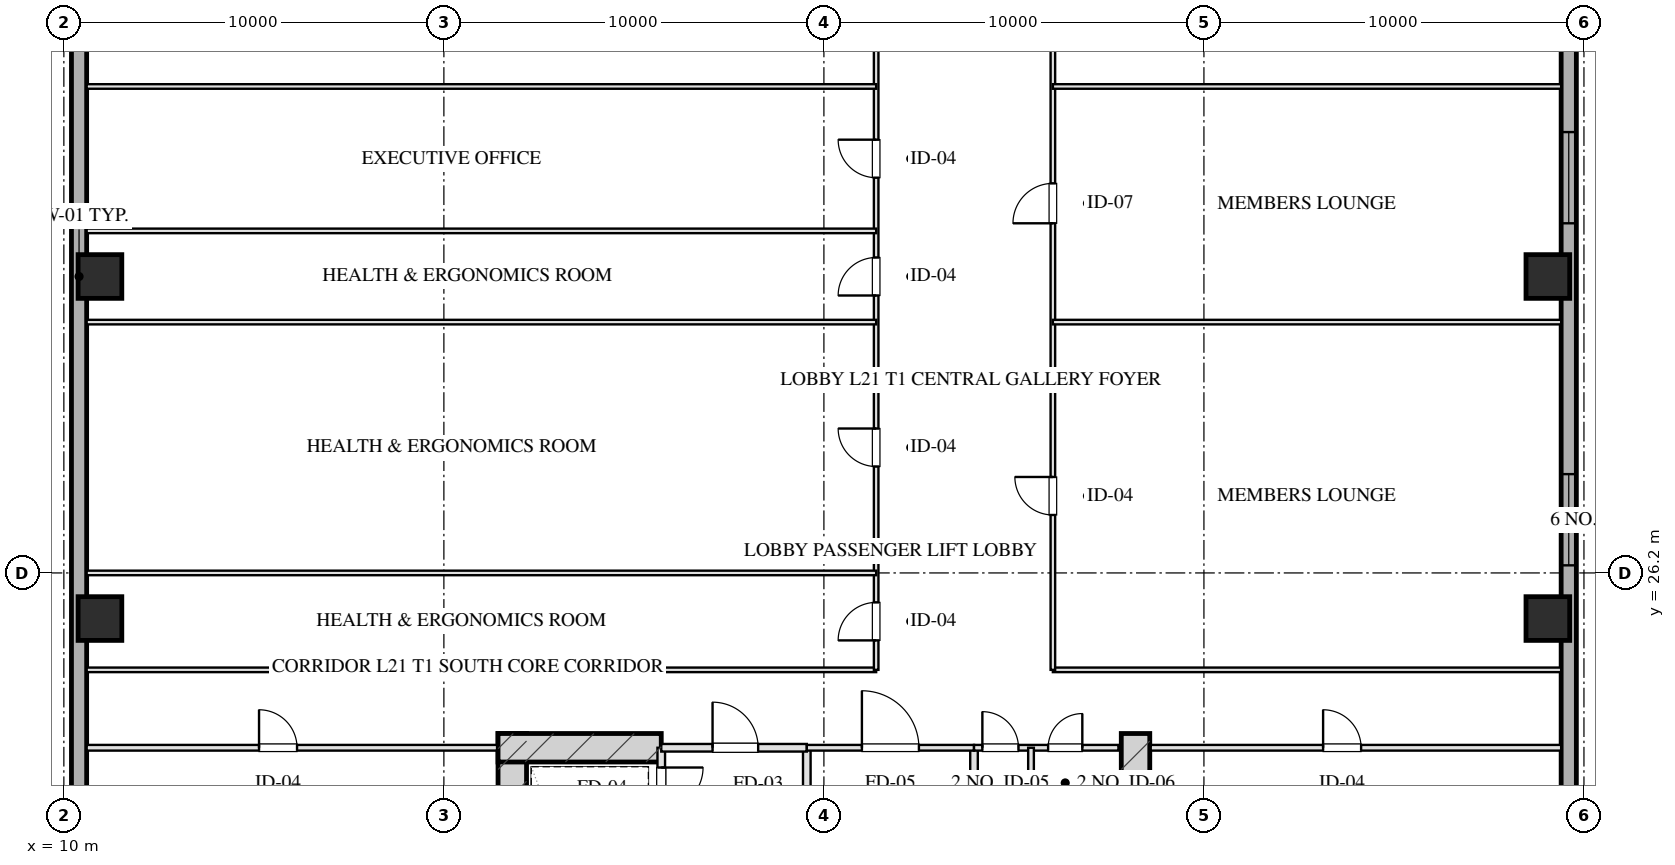
"""IFC4 building model, lengths in metres.
Left out: names, types, materials, properties, quantities, classifications, styles, units other than length and angle.
Written with IfcOpenShell. Run it as: python <this file> out.ifc"""

import sys

from ifc_helpers import new_model, si_unit, direction, frame, frame_2d, origin, origin_2d, place, context, subcontext, project, spatial, rectangle, hollow_rectangle, extrude, element, fill, save


model = new_model("IFC4")
c1 = context("Model", 3, precision=1e-05, world=origin(), true_north=direction((0.0, 1.0)))
c2 = subcontext(c1, "Body", "Model", "MODEL_VIEW")
j1 = project(units=[si_unit("LENGTHUNIT", "METRE"), si_unit("PLANEANGLEUNIT", "RADIAN")], contexts=[c1])
p1 = place(None, origin())
s1 = spatial("IfcSite", under=j1, at=p1, CompositionType="ELEMENT")
p2 = place(p1, origin())
s2 = spatial("IfcBuilding", under=s1, at=p2, CompositionType="ELEMENT")
p3 = place(p2, frame((0.0, 0.0, 85.1)))
s3 = spatial("IfcBuildingStorey", under=s2, at=p3, CompositionType="ELEMENT", Elevation=85.1)
for number, where, z_axis, x_axis in (
    (1, (21.8, 21.975, 0.0), (0.0, 0.0, 1.0), (0.0, -1.0, 0.0)),
    (2, (38.2, 21.975, 0.0), (0.0, 0.0, 1.0), (0.0, -1.0, 0.0)),
):
    element("IfcWall", number, at=place(p3, frame(where, z_axis=z_axis, x_axis=x_axis)), inside=s3, PredefinedType="SHEAR", context=c2, shape_type="SweptSolid", body=[
        extrude(rectangle(XDim=9.63, YDim=0.75, at=frame_2d((4.815, 0.0))), origin(), (0.0, 0.0, 1.0), 3.45),
    ])
p4 = place(p3, frame((21.425, 21.6, 0.0), z_axis=(0.0, 0.0, 1.0), x_axis=(1.0, 0.0, 0.0)))
e3 = element("IfcWall", 3, at=p4, inside=s3, PredefinedType="SHEAR", context=c2, shape_type="SweptSolid", body=[
    extrude(rectangle(XDim=4.295, YDim=0.75, at=frame_2d((2.147, 0.0))), origin(), (0.0, 0.0, 1.0), 3.45),
])
for number, where, z_axis, x_axis in (
    (4, (10.95, 25.0, 0.0), (0.0, 0.0, 1.0), (1.0, 0.0, 0.0)),
    (5, (10.95, 34.0, 0.0), (0.0, 0.0, 1.0), (1.0, 0.0, 0.0)),
    (6, (49.05, 25.0, 0.0), (0.0, 0.0, 1.0), (1.0, 0.0, 0.0)),
    (7, (49.05, 34.0, 0.0), (0.0, 0.0, 1.0), (1.0, 0.0, 0.0)),
):
    element("IfcColumn", number, at=place(p3, frame(where, z_axis=z_axis, x_axis=x_axis)), inside=s3, PredefinedType="COLUMN", context=c2, shape_type="SweptSolid", body=[
        extrude(hollow_rectangle(XDim=1.15, YDim=1.15, WallThickness=0.04, at=origin_2d()), origin(), (0.0, 0.0, 1.0), 3.451),
    ])
p5 = place(p3, frame((10.4, 7.2, 0.0), z_axis=(0.0, 0.0, 1.0), x_axis=(0.0, 1.0, 0.0)))
e8 = element("IfcWall", 8, at=p5, inside=s3, PredefinedType="SOLIDWALL", context=c2, shape_type="SweptSolid", body=[
    extrude(rectangle(XDim=53.6, YDim=0.4, at=frame_2d((26.8, 0.0))), origin(), (0.0, 0.0, 1.0), 2.61),
])
p6 = place(p3, frame((49.6, 60.8, 0.0), z_axis=(0.0, 0.0, 1.0), x_axis=(0.0, -1.0, 0.0)))
e9 = element("IfcWall", 9, at=p6, inside=s3, PredefinedType="SOLIDWALL", context=c2, shape_type="SweptSolid", body=[
    extrude(rectangle(XDim=53.6, YDim=0.4, at=frame_2d((26.8, 0.0))), origin(), (0.0, 0.0, 1.0), 2.61),
])
p7 = place(p6, frame((32.0, 0.0, 0.75)))
e10 = element("IfcOpeningElement", 10, at=p7, cuts=e9, PredefinedType="OPENING", context=c2, shape_type="SweptSolid", body=[
    extrude(rectangle(XDim=2.4, YDim=1.46, at=frame_2d((1.2, 0.73))), frame((0.0, 0.21, 0.0), z_axis=(0.0, -1.0, 0.0), x_axis=(1.0, 0.0, 0.0)), (0.0, 0.0, 1.0), 0.42),
])
p8 = place(p6, frame((23.0, 0.0, 0.75)))
e11 = element("IfcOpeningElement", 11, at=p8, cuts=e9, PredefinedType="OPENING", context=c2, shape_type="SweptSolid", body=[
    extrude(rectangle(XDim=2.4, YDim=1.46, at=frame_2d((1.2, 0.73))), frame((0.0, 0.21, 0.0), z_axis=(0.0, -1.0, 0.0), x_axis=(1.0, 0.0, 0.0)), (0.0, 0.0, 1.0), 0.42),
])
p9 = place(p3, frame((25.72, 21.6, 0.0), z_axis=(0.0, 0.0, 1.0), x_axis=(0.0, -1.0, 0.0)))
e12 = element("IfcWall", 12, at=p9, inside=s3, PredefinedType="PARTITIONING", context=c2, shape_type="SweptSolid", body=[
    extrude(rectangle(XDim=1.9, YDim=0.2, at=frame_2d((0.95, 0.0))), origin(), (0.0, 0.0, 1.0), 3.175),
])
p10 = place(p9, frame((0.52, 0.0, 0.0)))
e13 = element("IfcOpeningElement", 13, at=p10, cuts=e12, PredefinedType="OPENING", context=c2, shape_type="SweptSolid", body=[
    extrude(rectangle(XDim=1.1, YDim=2.05, at=frame_2d((0.55, 1.025))), frame((0.0, 0.11, 0.0), z_axis=(0.0, -1.0, 0.0), x_axis=(1.0, 0.0, 0.0)), (0.0, 0.0, 1.0), 0.22),
])
p11 = place(p3, frame((29.55, 21.6, 0.0), z_axis=(0.0, 0.0, 1.0), x_axis=(0.0, -1.0, 0.0)))
e14 = element("IfcWall", 14, at=p11, inside=s3, PredefinedType="PARTITIONING", context=c2, shape_type="SweptSolid", body=[
    extrude(rectangle(XDim=8.43, YDim=0.2, at=frame_2d((4.215, 0.0))), origin(), (0.0, 0.0, 1.0), 3.175),
])
p12 = place(p3, frame((25.72, 21.6, 0.0), z_axis=(0.0, 0.0, 1.0), x_axis=(1.0, 0.0, 0.0)))
e15 = element("IfcWall", 15, at=p12, inside=s3, PredefinedType="PARTITIONING", context=c2, shape_type="SweptSolid", body=[
    extrude(rectangle(XDim=3.83, YDim=0.2, at=frame_2d((1.915, 0.0))), origin(), (0.0, 0.0, 1.0), 3.175),
])
p13 = place(p12, frame((1.35, 0.0, 0.0)))
e16 = element("IfcOpeningElement", 16, at=p13, cuts=e15, PredefinedType="OPENING", context=c2, shape_type="SweptSolid", body=[
    extrude(rectangle(XDim=1.2, YDim=2.05, at=frame_2d((0.6, 1.025))), frame((0.0, 0.11, 0.0), z_axis=(0.0, -1.0, 0.0), x_axis=(1.0, 0.0, 0.0)), (0.0, 0.0, 1.0), 0.22),
])
p14 = place(p3, frame((33.95, 21.6, 0.0), z_axis=(0.0, 0.0, 1.0), x_axis=(0.0, -1.0, 0.0)))
e17 = element("IfcWall", 17, at=p14, inside=s3, PredefinedType="PARTITIONING", context=c2, shape_type="SweptSolid", body=[
    extrude(rectangle(XDim=8.43, YDim=0.2, at=frame_2d((4.215, 0.0))), origin(), (0.0, 0.0, 1.0), 3.175),
])
p15 = place(p3, frame((29.55, 21.6, 0.0), z_axis=(0.0, 0.0, 1.0), x_axis=(1.0, 0.0, 0.0)))
e18 = element("IfcWall", 18, at=p15, inside=s3, PredefinedType="PARTITIONING", context=c2, shape_type="SweptSolid", body=[
    extrude(rectangle(XDim=4.4, YDim=0.15, at=frame_2d((2.2, 0.0))), origin(), (0.0, 0.0, 1.0), 3.175),
])
p16 = place(p15, frame((1.45, 0.0, 0.0)))
e19 = element("IfcOpeningElement", 19, at=p16, cuts=e18, PredefinedType="OPENING", context=c2, shape_type="SweptSolid", body=[
    extrude(rectangle(XDim=1.5, YDim=2.05, at=frame_2d((0.75, 1.025))), frame((0.0, 0.085, 0.0), z_axis=(0.0, -1.0, 0.0), x_axis=(1.0, 0.0, 0.0)), (0.0, 0.0, 1.0), 0.17),
])
p17 = place(p3, frame((33.95, 21.6, 0.0), z_axis=(0.0, 0.0, 1.0), x_axis=(1.0, 0.0, 0.0)))
e20 = element("IfcWall", 20, at=p17, inside=s3, PredefinedType="PARTITIONING", context=c2, shape_type="SweptSolid", body=[
    extrude(rectangle(XDim=3.8, YDim=0.15, at=frame_2d((1.9, 0.0))), origin(), (0.0, 0.0, 1.0), 3.175),
])
p18 = place(p17, frame((0.22, 0.0, 0.0)))
e21 = element("IfcOpeningElement", 21, at=p18, cuts=e20, PredefinedType="OPENING", context=c2, shape_type="SweptSolid", body=[
    extrude(rectangle(XDim=0.95, YDim=2.05, at=frame_2d((0.475, 1.025))), frame((0.0, 0.085, 0.0), z_axis=(0.0, -1.0, 0.0), x_axis=(1.0, 0.0, 0.0)), (0.0, 0.0, 1.0), 0.17),
])
p19 = place(p17, frame((1.95, 0.0, 0.0)))
e22 = element("IfcOpeningElement", 22, at=p19, cuts=e20, PredefinedType="OPENING", context=c2, shape_type="SweptSolid", body=[
    extrude(rectangle(XDim=0.9, YDim=2.05, at=frame_2d((0.45, 1.025))), frame((0.0, 0.085, 0.0), z_axis=(0.0, -1.0, 0.0), x_axis=(1.0, 0.0, 0.0)), (0.0, 0.0, 1.0), 0.17),
])
p20 = place(p3, frame((35.45, 21.6, 0.0), z_axis=(0.0, 0.0, 1.0), x_axis=(0.0, -1.0, 0.0)))
e23 = element("IfcWall", 23, at=p20, inside=s3, PredefinedType="PARTITIONING", context=c2, shape_type="SweptSolid", body=[
    extrude(rectangle(XDim=8.43, YDim=0.15, at=frame_2d((4.215, 0.0))), origin(), (0.0, 0.0, 1.0), 2.815),
])
p21 = place(p20, frame((2.55, 0.0, 0.0)))
e24 = element("IfcOpeningElement", 24, at=p21, cuts=e23, PredefinedType="OPENING", context=c2, shape_type="SweptSolid", body=[
    extrude(rectangle(XDim=0.95, YDim=2.05, at=frame_2d((0.475, 1.025))), frame((0.0, 0.085, 0.0), z_axis=(0.0, -1.0, 0.0), x_axis=(1.0, 0.0, 0.0)), (0.0, 0.0, 1.0), 0.17),
])
p22 = place(p20, frame((5.6, 0.0, 0.0)))
e25 = element("IfcOpeningElement", 25, at=p22, cuts=e23, PredefinedType="OPENING", context=c2, shape_type="SweptSolid", body=[
    extrude(rectangle(XDim=0.9, YDim=2.05, at=frame_2d((0.45, 1.025))), frame((0.0, 0.085, 0.0), z_axis=(0.0, -1.0, 0.0), x_axis=(1.0, 0.0, 0.0)), (0.0, 0.0, 1.0), 0.17),
])
p23 = place(p3, frame((10.6, 21.6, 0.0), z_axis=(0.0, 0.0, 1.0), x_axis=(1.0, 0.0, 0.0)))
e26 = element("IfcWall", 26, at=p23, inside=s3, PredefinedType="PARTITIONING", context=c2, shape_type="SweptSolid", body=[
    extrude(rectangle(XDim=10.8, YDim=0.15, at=frame_2d((5.4, 0.0))), origin(), (0.0, 0.0, 1.0), 3.175),
])
p24 = place(p23, frame((4.536, 0.0, 0.0)))
e27 = element("IfcOpeningElement", 27, at=p24, cuts=e26, PredefinedType="OPENING", context=c2, shape_type="SweptSolid", body=[
    extrude(rectangle(XDim=1.0, YDim=2.05, at=frame_2d((0.5, 1.025))), frame((0.0, 0.085, 0.0), z_axis=(0.0, -1.0, 0.0), x_axis=(1.0, 0.0, 0.0)), (0.0, 0.0, 1.0), 0.17),
])
p25 = place(p3, frame((38.6, 21.6, 0.0), z_axis=(0.0, 0.0, 1.0), x_axis=(1.0, 0.0, 0.0)))
e28 = element("IfcWall", 28, at=p25, inside=s3, PredefinedType="PARTITIONING", context=c2, shape_type="SweptSolid", body=[
    extrude(rectangle(XDim=10.8, YDim=0.15, at=frame_2d((5.4, 0.0))), origin(), (0.0, 0.0, 1.0), 3.175),
])
p26 = place(p25, frame((4.536, 0.0, 0.0)))
e29 = element("IfcOpeningElement", 29, at=p26, cuts=e28, PredefinedType="OPENING", context=c2, shape_type="SweptSolid", body=[
    extrude(rectangle(XDim=1.0, YDim=2.05, at=frame_2d((0.5, 1.025))), frame((0.0, 0.085, 0.0), z_axis=(0.0, -1.0, 0.0), x_axis=(1.0, 0.0, 0.0)), (0.0, 0.0, 1.0), 0.17),
])
p27 = place(p3, frame((10.6, 23.65, 0.0), z_axis=(0.0, 0.0, 1.0), x_axis=(1.0, 0.0, 0.0)))
e30 = element("IfcWall", 30, at=p27, inside=s3, PredefinedType="PARTITIONING", context=c2, shape_type="SweptSolid", body=[
    extrude(rectangle(XDim=20.775, YDim=0.12, at=frame_2d((10.387, 0.0))), origin(), (0.0, 0.0, 1.0), 3.175),
])
p28 = place(p3, frame((36.025, 23.65, 0.0), z_axis=(0.0, 0.0, 1.0), x_axis=(1.0, 0.0, 0.0)))
e31 = element("IfcWall", 31, at=p28, inside=s3, PredefinedType="PARTITIONING", context=c2, shape_type="SweptSolid", body=[
    extrude(rectangle(XDim=13.375, YDim=0.12, at=frame_2d((6.688, 0.0))), origin(), (0.0, 0.0, 1.0), 3.175),
])
p29 = place(p3, frame((31.375, 23.65, 0.0), z_axis=(0.0, 0.0, 1.0), x_axis=(0.0, 1.0, 0.0)))
e32 = element("IfcWall", 32, at=p29, inside=s3, PredefinedType="PARTITIONING", context=c2, shape_type="SweptSolid", body=[
    extrude(rectangle(XDim=20.7, YDim=0.12, at=frame_2d((10.35, 0.0))), origin(), (0.0, 0.0, 1.0), 3.175),
])
p30 = place(p29, frame((0.775, 0.0, 0.0)))
e33 = element("IfcOpeningElement", 33, at=p30, cuts=e32, PredefinedType="OPENING", context=c2, shape_type="SweptSolid", body=[
    extrude(rectangle(XDim=1.0, YDim=2.05, at=frame_2d((0.5, 1.025))), frame((0.0, 0.07, 0.0), z_axis=(0.0, -1.0, 0.0), x_axis=(1.0, 0.0, 0.0)), (0.0, 0.0, 1.0), 0.14),
])
p31 = place(p29, frame((5.35, 0.0, 0.0)))
e34 = element("IfcOpeningElement", 34, at=p31, cuts=e32, PredefinedType="OPENING", context=c2, shape_type="SweptSolid", body=[
    extrude(rectangle(XDim=1.0, YDim=2.05, at=frame_2d((0.5, 1.025))), frame((0.0, 0.07, 0.0), z_axis=(0.0, -1.0, 0.0), x_axis=(1.0, 0.0, 0.0)), (0.0, 0.0, 1.0), 0.14),
])
p32 = place(p29, frame((9.85, 0.0, 0.0)))
e35 = element("IfcOpeningElement", 35, at=p32, cuts=e32, PredefinedType="OPENING", context=c2, shape_type="SweptSolid", body=[
    extrude(rectangle(XDim=1.0, YDim=2.05, at=frame_2d((0.5, 1.025))), frame((0.0, 0.07, 0.0), z_axis=(0.0, -1.0, 0.0), x_axis=(1.0, 0.0, 0.0)), (0.0, 0.0, 1.0), 0.14),
])
p33 = place(p29, frame((12.95, 0.0, 0.0)))
e36 = element("IfcOpeningElement", 36, at=p33, cuts=e32, PredefinedType="OPENING", context=c2, shape_type="SweptSolid", body=[
    extrude(rectangle(XDim=1.0, YDim=2.05, at=frame_2d((0.5, 1.025))), frame((0.0, 0.07, 0.0), z_axis=(0.0, -1.0, 0.0), x_axis=(1.0, 0.0, 0.0)), (0.0, 0.0, 1.0), 0.14),
])
p34 = place(p29, frame((17.525, 0.0, 0.0)))
e37 = element("IfcOpeningElement", 37, at=p34, cuts=e32, PredefinedType="OPENING", context=c2, shape_type="SweptSolid", body=[
    extrude(rectangle(XDim=1.0, YDim=2.05, at=frame_2d((0.5, 1.025))), frame((0.0, 0.07, 0.0), z_axis=(0.0, -1.0, 0.0), x_axis=(1.0, 0.0, 0.0)), (0.0, 0.0, 1.0), 0.14),
])
p35 = place(p3, frame((36.025, 23.65, 0.0), z_axis=(0.0, 0.0, 1.0), x_axis=(0.0, 1.0, 0.0)))
e38 = element("IfcWall", 38, at=p35, inside=s3, PredefinedType="PARTITIONING", context=c2, shape_type="SweptSolid", body=[
    extrude(rectangle(XDim=20.7, YDim=0.12, at=frame_2d((10.35, 0.0))), origin(), (0.0, 0.0, 1.0), 3.175),
])
p36 = place(p35, frame((4.075, 0.0, 0.0)))
e39 = element("IfcOpeningElement", 39, at=p36, cuts=e38, PredefinedType="OPENING", context=c2, shape_type="SweptSolid", body=[
    extrude(rectangle(XDim=1.0, YDim=2.05, at=frame_2d((0.5, 1.025))), frame((0.0, 0.07, 0.0), z_axis=(0.0, -1.0, 0.0), x_axis=(1.0, 0.0, 0.0)), (0.0, 0.0, 1.0), 0.14),
])
p37 = place(p35, frame((11.75, 0.0, 0.0)))
e40 = element("IfcOpeningElement", 40, at=p37, cuts=e38, PredefinedType="OPENING", context=c2, shape_type="SweptSolid", body=[
    extrude(rectangle(XDim=1.05, YDim=2.05, at=frame_2d((0.525, 1.025))), frame((0.0, 0.07, 0.0), z_axis=(0.0, -1.0, 0.0), x_axis=(1.0, 0.0, 0.0)), (0.0, 0.0, 1.0), 0.14),
])
p38 = place(p35, frame((17.525, 0.0, 0.0)))
e41 = element("IfcOpeningElement", 41, at=p38, cuts=e38, PredefinedType="OPENING", context=c2, shape_type="SweptSolid", body=[
    extrude(rectangle(XDim=1.0, YDim=2.05, at=frame_2d((0.5, 1.025))), frame((0.0, 0.07, 0.0), z_axis=(0.0, -1.0, 0.0), x_axis=(1.0, 0.0, 0.0)), (0.0, 0.0, 1.0), 0.14),
])
for number, where, z_axis, x_axis in (
    (42, (10.6, 26.2, 0.0), (0.0, 0.0, 1.0), (1.0, 0.0, 0.0)),
    (43, (10.6, 32.8, 0.0), (0.0, 0.0, 1.0), (1.0, 0.0, 0.0)),
    (44, (10.6, 35.2, 0.0), (0.0, 0.0, 1.0), (1.0, 0.0, 0.0)),
    (45, (10.6, 39.0, 0.0), (0.0, 0.0, 1.0), (1.0, 0.0, 0.0)),
):
    element("IfcWall", number, at=place(p3, frame(where, z_axis=z_axis, x_axis=x_axis)), inside=s3, PredefinedType="PARTITIONING", context=c2, shape_type="SweptSolid", body=[
        extrude(rectangle(XDim=20.775, YDim=0.12, at=frame_2d((10.387, 0.0))), origin(), (0.0, 0.0, 1.0), 3.175),
    ])
for number, where, z_axis, x_axis in (
    (46, (36.025, 32.8, 0.0), (0.0, 0.0, 1.0), (1.0, 0.0, 0.0)),
    (47, (36.025, 39.0, 0.0), (0.0, 0.0, 1.0), (1.0, 0.0, 0.0)),
):
    element("IfcWall", number, at=place(p3, frame(where, z_axis=z_axis, x_axis=x_axis)), inside=s3, PredefinedType="PARTITIONING", context=c2, shape_type="SweptSolid", body=[
        extrude(rectangle(XDim=13.375, YDim=0.12, at=frame_2d((6.688, 0.0))), origin(), (0.0, 0.0, 1.0), 3.175),
    ])
p39 = place(p7, origin())
e48 = element("IfcWindow", 48, at=p39, inside=s3, PartitioningType="TRIPLE_PANEL_VERTICAL", PredefinedType="WINDOW", context=c2, shape_type="SweptSolid", body=[
    extrude(rectangle(XDim=2.4, YDim=1.46, at=frame_2d((1.2, 0.73))), frame((0.0, 0.03, 0.0), z_axis=(0.0, -1.0, 0.0), x_axis=(1.0, 0.0, 0.0)), (0.0, 0.0, 1.0), 0.06),
])
fill(e10, e48)
p40 = place(p8, origin())
e49 = element("IfcWindow", 49, at=p40, inside=s3, PartitioningType="TRIPLE_PANEL_VERTICAL", PredefinedType="WINDOW", context=c2, shape_type="SweptSolid", body=[
    extrude(rectangle(XDim=2.4, YDim=1.46, at=frame_2d((1.2, 0.73))), frame((0.0, 0.03, 0.0), z_axis=(0.0, -1.0, 0.0), x_axis=(1.0, 0.0, 0.0)), (0.0, 0.0, 1.0), 0.06),
])
fill(e11, e49)
p41 = place(p10, origin())
e50 = element("IfcDoor", 50, at=p41, inside=s3, OperationType="SINGLE_SWING_LEFT", PredefinedType="DOOR", context=c2, shape_type="SweptSolid", body=[
    extrude(rectangle(XDim=1.1, YDim=2.05, at=frame_2d((0.55, 1.025))), frame((0.0, 0.025, 0.0), z_axis=(0.0, -1.0, 0.0), x_axis=(1.0, 0.0, 0.0)), (0.0, 0.0, 1.0), 0.05),
])
fill(e13, e50)
p42 = place(p13, origin())
e51 = element("IfcDoor", 51, at=p42, inside=s3, OperationType="SINGLE_SWING_LEFT", PredefinedType="DOOR", context=c2, shape_type="SweptSolid", body=[
    extrude(rectangle(XDim=1.2, YDim=2.05, at=frame_2d((0.6, 1.025))), frame((0.0, 0.025, 0.0), z_axis=(0.0, -1.0, 0.0), x_axis=(1.0, 0.0, 0.0)), (0.0, 0.0, 1.0), 0.05),
])
fill(e16, e51)
p43 = place(p16, origin())
e52 = element("IfcDoor", 52, at=p43, inside=s3, OperationType="SINGLE_SWING_LEFT", PredefinedType="DOOR", context=c2, shape_type="SweptSolid", body=[
    extrude(rectangle(XDim=1.5, YDim=2.05, at=frame_2d((0.75, 1.025))), frame((0.0, 0.025, 0.0), z_axis=(0.0, -1.0, 0.0), x_axis=(1.0, 0.0, 0.0)), (0.0, 0.0, 1.0), 0.05),
])
fill(e19, e52)
p44 = place(p18, origin())
e53 = element("IfcDoor", 53, at=p44, inside=s3, OperationType="SINGLE_SWING_LEFT", PredefinedType="DOOR", context=c2, shape_type="SweptSolid", body=[
    extrude(rectangle(XDim=0.95, YDim=2.05, at=frame_2d((0.475, 1.025))), frame((0.0, 0.025, 0.0), z_axis=(0.0, -1.0, 0.0), x_axis=(1.0, 0.0, 0.0)), (0.0, 0.0, 1.0), 0.05),
])
fill(e21, e53)
p45 = place(p19, origin())
e54 = element("IfcDoor", 54, at=p45, inside=s3, OperationType="SINGLE_SWING_RIGHT", PredefinedType="DOOR", context=c2, shape_type="SweptSolid", body=[
    extrude(rectangle(XDim=0.9, YDim=2.05, at=frame_2d((0.45, 1.025))), frame((0.0, 0.025, 0.0), z_axis=(0.0, -1.0, 0.0), x_axis=(1.0, 0.0, 0.0)), (0.0, 0.0, 1.0), 0.05),
])
fill(e22, e54)
p46 = place(p24, origin())
e55 = element("IfcDoor", 55, at=p46, inside=s3, OperationType="SINGLE_SWING_LEFT", PredefinedType="DOOR", context=c2, shape_type="SweptSolid", body=[
    extrude(rectangle(XDim=1.0, YDim=2.05, at=frame_2d((0.5, 1.025))), frame((0.0, 0.025, 0.0), z_axis=(0.0, -1.0, 0.0), x_axis=(1.0, 0.0, 0.0)), (0.0, 0.0, 1.0), 0.05),
])
fill(e27, e55)
p47 = place(p26, origin())
e56 = element("IfcDoor", 56, at=p47, inside=s3, OperationType="SINGLE_SWING_LEFT", PredefinedType="DOOR", context=c2, shape_type="SweptSolid", body=[
    extrude(rectangle(XDim=1.0, YDim=2.05, at=frame_2d((0.5, 1.025))), frame((0.0, 0.025, 0.0), z_axis=(0.0, -1.0, 0.0), x_axis=(1.0, 0.0, 0.0)), (0.0, 0.0, 1.0), 0.05),
])
fill(e29, e56)
p48 = place(p30, origin())
e57 = element("IfcDoor", 57, at=p48, inside=s3, OperationType="SINGLE_SWING_LEFT", PredefinedType="DOOR", context=c2, shape_type="SweptSolid", body=[
    extrude(rectangle(XDim=1.0, YDim=2.05, at=frame_2d((0.5, 1.025))), frame((0.0, 0.025, 0.0), z_axis=(0.0, -1.0, 0.0), x_axis=(1.0, 0.0, 0.0)), (0.0, 0.0, 1.0), 0.05),
])
fill(e33, e57)
p49 = place(p31, origin())
e58 = element("IfcDoor", 58, at=p49, inside=s3, OperationType="SINGLE_SWING_RIGHT", PredefinedType="DOOR", context=c2, shape_type="SweptSolid", body=[
    extrude(rectangle(XDim=1.0, YDim=2.05, at=frame_2d((0.5, 1.025))), frame((0.0, 0.025, 0.0), z_axis=(0.0, -1.0, 0.0), x_axis=(1.0, 0.0, 0.0)), (0.0, 0.0, 1.0), 0.05),
])
fill(e34, e58)
p50 = place(p32, origin())
e59 = element("IfcDoor", 59, at=p50, inside=s3, OperationType="SINGLE_SWING_LEFT", PredefinedType="DOOR", context=c2, shape_type="SweptSolid", body=[
    extrude(rectangle(XDim=1.0, YDim=2.05, at=frame_2d((0.5, 1.025))), frame((0.0, 0.025, 0.0), z_axis=(0.0, -1.0, 0.0), x_axis=(1.0, 0.0, 0.0)), (0.0, 0.0, 1.0), 0.05),
])
fill(e35, e59)
p51 = place(p33, origin())
e60 = element("IfcDoor", 60, at=p51, inside=s3, OperationType="SINGLE_SWING_RIGHT", PredefinedType="DOOR", context=c2, shape_type="SweptSolid", body=[
    extrude(rectangle(XDim=1.0, YDim=2.05, at=frame_2d((0.5, 1.025))), frame((0.0, 0.025, 0.0), z_axis=(0.0, -1.0, 0.0), x_axis=(1.0, 0.0, 0.0)), (0.0, 0.0, 1.0), 0.05),
])
fill(e36, e60)
p52 = place(p36, origin())
e61 = element("IfcDoor", 61, at=p52, inside=s3, OperationType="SINGLE_SWING_RIGHT", PredefinedType="DOOR", context=c2, shape_type="SweptSolid", body=[
    extrude(rectangle(XDim=1.0, YDim=2.05, at=frame_2d((0.5, 1.025))), frame((0.0, 0.025, 0.0), z_axis=(0.0, -1.0, 0.0), x_axis=(1.0, 0.0, 0.0)), (0.0, 0.0, 1.0), 0.05),
])
fill(e39, e61)
p53 = place(p37, origin())
e62 = element("IfcDoor", 62, at=p53, inside=s3, OperationType="SINGLE_SWING_LEFT", PredefinedType="DOOR", context=c2, shape_type="SweptSolid", body=[
    extrude(rectangle(XDim=1.05, YDim=2.05, at=frame_2d((0.525, 1.025))), frame((0.0, 0.025, 0.0), z_axis=(0.0, -1.0, 0.0), x_axis=(1.0, 0.0, 0.0)), (0.0, 0.0, 1.0), 0.05),
])
fill(e40, e62)
save(model, sys.argv[1])
